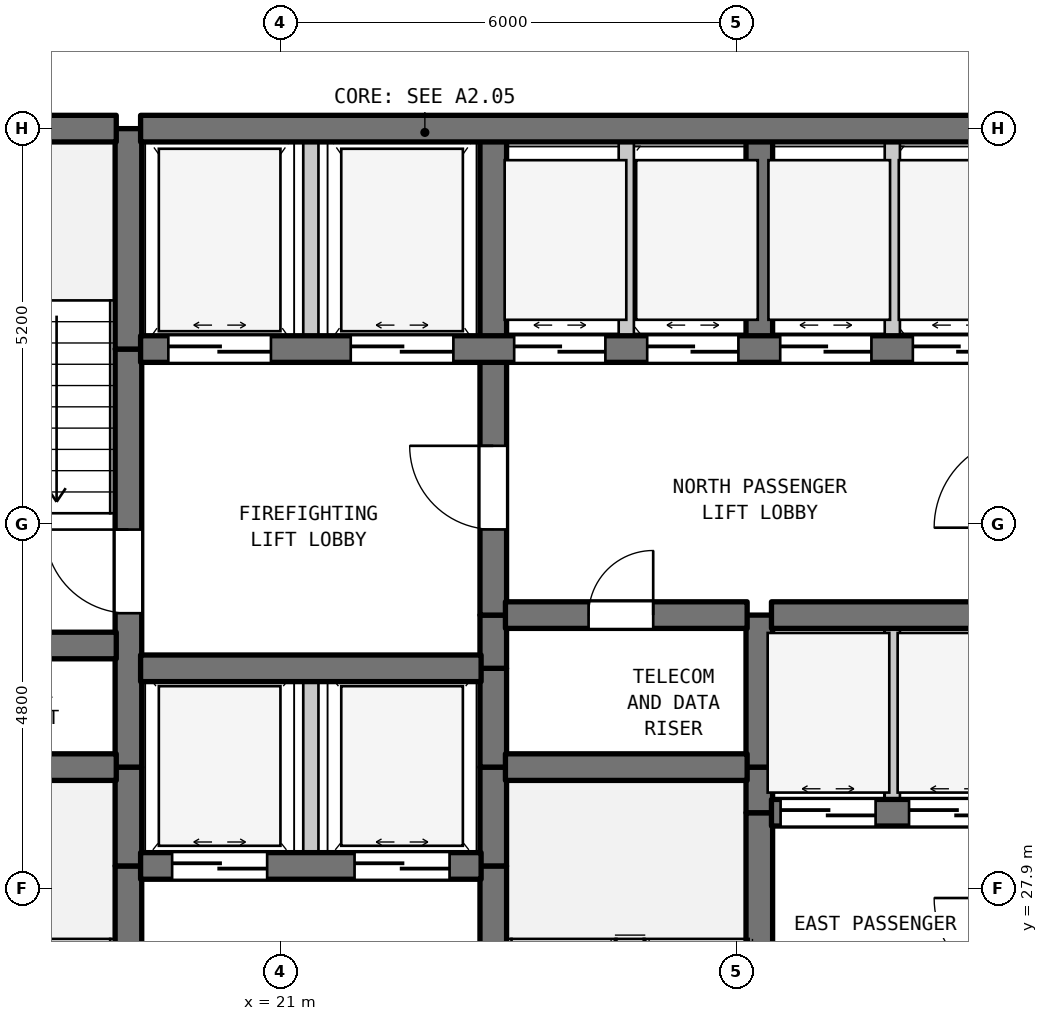
"""IFC4 building model, lengths in metres.
Left out: names, types, materials, properties, quantities, classifications, styles, units other than length and angle.
Written with IfcOpenShell. Run it as: python <this file> out.ifc"""

import sys

from ifc_helpers import new_model, si_unit, direction, frame, frame_2d, origin, place, context, subcontext, project, spatial, rectangle, extrude, element, fill, save


model = new_model("IFC4")
c1 = context("Model", 3, precision=1e-05, world=origin(), true_north=direction((0.0, 1.0)))
c2 = subcontext(c1, "Body", "Model", "MODEL_VIEW")
j1 = project(units=[si_unit("LENGTHUNIT", "METRE"), si_unit("PLANEANGLEUNIT", "RADIAN")], contexts=[c1])
p1 = place(None, origin())
s1 = spatial("IfcSite", under=j1, at=p1, CompositionType="ELEMENT")
p2 = place(p1, origin())
s2 = spatial("IfcBuilding", under=s1, at=p2, CompositionType="ELEMENT")
p3 = place(p2, frame((0.0, 0.0, 113.1)))
s3 = spatial("IfcBuildingStorey", under=s2, at=p3, CompositionType="ELEMENT", Elevation=113.1)
p4 = place(p3, frame((19.0, 22.7, 0.0), z_axis=(0.0, 0.0, 1.0), x_axis=(0.0, 1.0, 0.0)))
e1 = element("IfcWall", 1, at=p4, inside=s3, PredefinedType="SHEAR", context=c2, shape_type="SweptSolid", body=[
    extrude(rectangle(XDim=5.5, YDim=0.35, at=frame_2d((2.75, 0.0))), origin(), (0.0, 0.0, 1.0), 3.385),
])
p5 = place(p4, frame((0.631, 0.0, 0.0)))
e2 = element("IfcOpeningElement", 2, at=p5, cuts=e1, PredefinedType="OPENING", context=c2, shape_type="SweptSolid", body=[
    extrude(rectangle(XDim=1.1, YDim=2.15, at=frame_2d((0.55, 1.075))), frame((0.0, 0.185, 0.0), z_axis=(0.0, -1.0, 0.0), x_axis=(1.0, 0.0, 0.0)), (0.0, 0.0, 1.0), 0.37),
])
p6 = place(p3, frame((19.0, 28.2, 0.0), z_axis=(0.0, 0.0, 1.0), x_axis=(0.0, 1.0, 0.0)))
e3 = element("IfcWall", 3, at=p6, inside=s3, PredefinedType="SHEAR", context=c2, shape_type="SweptSolid", body=[
    extrude(rectangle(XDim=1.3, YDim=0.35, at=frame_2d((0.65, 0.0))), origin(), (0.0, 0.0, 1.0), 3.385),
])
p7 = place(p3, frame((19.0, 29.5, 0.0), z_axis=(0.0, 0.0, 1.0), x_axis=(0.0, 1.0, 0.0)))
e4 = element("IfcWall", 4, at=p7, inside=s3, PredefinedType="SHEAR", context=c2, shape_type="SweptSolid", body=[
    extrude(rectangle(XDim=5.5, YDim=0.35, at=frame_2d((2.75, 0.0))), origin(), (0.0, 0.0, 1.0), 3.385),
])
p8 = place(p7, frame((2.025, 0.0, 0.0)))
e5 = element("IfcOpeningElement", 5, at=p8, cuts=e4, PredefinedType="OPENING", context=c2, shape_type="SweptSolid", body=[
    extrude(rectangle(XDim=1.1, YDim=2.15, at=frame_2d((0.55, 1.075))), frame((0.0, 0.185, 0.0), z_axis=(0.0, -1.0, 0.0), x_axis=(1.0, 0.0, 0.0)), (0.0, 0.0, 1.0), 0.37),
])
p9 = place(p3, frame((19.0, 35.0, 0.0), z_axis=(0.0, 0.0, 1.0), x_axis=(0.0, 1.0, 0.0)))
e6 = element("IfcWall", 6, at=p9, inside=s3, PredefinedType="SHEAR", context=c2, shape_type="SweptSolid", body=[
    extrude(rectangle(XDim=2.9, YDim=0.35, at=frame_2d((1.45, 0.0))), origin(), (0.0, 0.0, 1.0), 3.385),
])
p10 = place(p3, frame((21.4, 28.2, 0.0), z_axis=(0.0, 0.0, 1.0), x_axis=(0.0, 1.0, 0.0)))
e7 = element("IfcWall", 7, at=p10, inside=s3, PredefinedType="STANDARD", context=c2, shape_type="SweptSolid", body=[
    extrude(rectangle(XDim=2.6, YDim=0.2, at=frame_2d((1.3, 0.0))), origin(), (0.0, 0.0, 1.0), 3.385),
])
p11 = place(p3, frame((21.4, 35.0, 0.0), z_axis=(0.0, 0.0, 1.0), x_axis=(0.0, 1.0, 0.0)))
e8 = element("IfcWall", 8, at=p11, inside=s3, PredefinedType="STANDARD", context=c2, shape_type="SweptSolid", body=[
    extrude(rectangle(XDim=2.9, YDim=0.2, at=frame_2d((1.45, 0.0))), origin(), (0.0, 0.0, 1.0), 3.385),
])
p12 = place(p3, frame((23.8, 22.7, 0.0), z_axis=(0.0, 0.0, 1.0), x_axis=(0.0, 1.0, 0.0)))
e9 = element("IfcWall", 9, at=p12, inside=s3, PredefinedType="SHEAR", context=c2, shape_type="SweptSolid", body=[
    extrude(rectangle(XDim=5.5, YDim=0.35, at=frame_2d((2.75, 0.0))), origin(), (0.0, 0.0, 1.0), 3.385),
])
p13 = place(p12, frame((0.235, 0.0, 0.0)))
e10 = element("IfcOpeningElement", 10, at=p13, cuts=e9, PredefinedType="OPENING", context=c2, shape_type="SweptSolid", body=[
    extrude(rectangle(XDim=1.1, YDim=2.15, at=frame_2d((0.55, 1.075))), frame((0.0, 0.185, 0.0), z_axis=(0.0, -1.0, 0.0), x_axis=(1.0, 0.0, 0.0)), (0.0, 0.0, 1.0), 0.37),
])
for number, where, z_axis, x_axis in (
    (11, (23.8, 28.2, 0.0), (0.0, 0.0, 1.0), (0.0, 1.0, 0.0)),
    (12, (23.8, 29.5, 0.0), (0.0, 0.0, 1.0), (0.0, 1.0, 0.0)),
):
    element("IfcWall", number, at=place(p3, frame(where, z_axis=z_axis, x_axis=x_axis)), inside=s3, PredefinedType="SHEAR", context=c2, shape_type="SweptSolid", body=[
        extrude(rectangle(XDim=1.3, YDim=0.35, at=frame_2d((0.65, 0.0))), origin(), (0.0, 0.0, 1.0), 3.385),
    ])
p14 = place(p3, frame((23.8, 30.8, 0.0), z_axis=(0.0, 0.0, 1.0), x_axis=(0.0, 1.0, 0.0)))
e13 = element("IfcWall", 13, at=p14, inside=s3, PredefinedType="SHEAR", context=c2, shape_type="SweptSolid", body=[
    extrude(rectangle(XDim=0.7, YDim=0.35, at=frame_2d((0.35, 0.0))), origin(), (0.0, 0.0, 1.0), 3.385),
])
p15 = place(p3, frame((23.8, 31.5, 0.0), z_axis=(0.0, 0.0, 1.0), x_axis=(0.0, 1.0, 0.0)))
e14 = element("IfcWall", 14, at=p15, inside=s3, PredefinedType="SHEAR", context=c2, shape_type="SweptSolid", body=[
    extrude(rectangle(XDim=3.5, YDim=0.35, at=frame_2d((1.75, 0.0))), origin(), (0.0, 0.0, 1.0), 3.385),
])
p16 = place(p15, frame((1.127, 0.0, 0.0)))
e15 = element("IfcOpeningElement", 15, at=p16, cuts=e14, PredefinedType="OPENING", context=c2, shape_type="SweptSolid", body=[
    extrude(rectangle(XDim=1.1, YDim=2.15, at=frame_2d((0.55, 1.075))), frame((0.0, 0.185, 0.0), z_axis=(0.0, -1.0, 0.0), x_axis=(1.0, 0.0, 0.0)), (0.0, 0.0, 1.0), 0.37),
])
p17 = place(p3, frame((23.8, 35.0, 0.0), z_axis=(0.0, 0.0, 1.0), x_axis=(0.0, 1.0, 0.0)))
e16 = element("IfcWall", 16, at=p17, inside=s3, PredefinedType="SHEAR", context=c2, shape_type="SweptSolid", body=[
    extrude(rectangle(XDim=2.9, YDim=0.35, at=frame_2d((1.45, 0.0))), origin(), (0.0, 0.0, 1.0), 3.385),
])
p18 = place(p3, frame((25.55, 35.0, 0.0), z_axis=(0.0, 0.0, 1.0), x_axis=(0.0, 1.0, 0.0)))
e17 = element("IfcWall", 17, at=p18, inside=s3, PredefinedType="STANDARD", context=c2, shape_type="SweptSolid", body=[
    extrude(rectangle(XDim=2.9, YDim=0.2, at=frame_2d((1.45, 0.0))), origin(), (0.0, 0.0, 1.0), 3.385),
])
p19 = place(p3, frame((27.3, 25.6, 0.0), z_axis=(0.0, 0.0, 1.0), x_axis=(0.0, 1.0, 0.0)))
e18 = element("IfcWall", 18, at=p19, inside=s3, PredefinedType="SHEAR", context=c2, shape_type="SweptSolid", body=[
    extrude(rectangle(XDim=3.3, YDim=0.35, at=frame_2d((1.65, 0.0))), origin(), (0.0, 0.0, 1.0), 3.385),
])
p20 = place(p3, frame((27.3, 28.9, 0.0), z_axis=(0.0, 0.0, 1.0), x_axis=(0.0, 1.0, 0.0)))
e19 = element("IfcWall", 19, at=p20, inside=s3, PredefinedType="SHEAR", context=c2, shape_type="SweptSolid", body=[
    extrude(rectangle(XDim=0.6, YDim=0.35, at=frame_2d((0.3, 0.0))), origin(), (0.0, 0.0, 1.0), 3.385),
])
p21 = place(p3, frame((27.3, 29.5, 0.0), z_axis=(0.0, 0.0, 1.0), x_axis=(0.0, 1.0, 0.0)))
e20 = element("IfcWall", 20, at=p21, inside=s3, PredefinedType="SHEAR", context=c2, shape_type="SweptSolid", body=[
    extrude(rectangle(XDim=2.0, YDim=0.35, at=frame_2d((1.0, 0.0))), origin(), (0.0, 0.0, 1.0), 3.385),
])
p22 = place(p3, frame((27.3, 35.0, 0.0), z_axis=(0.0, 0.0, 1.0), x_axis=(0.0, 1.0, 0.0)))
e21 = element("IfcWall", 21, at=p22, inside=s3, PredefinedType="SHEAR", context=c2, shape_type="SweptSolid", body=[
    extrude(rectangle(XDim=2.9, YDim=0.35, at=frame_2d((1.45, 0.0))), origin(), (0.0, 0.0, 1.0), 3.385),
])
p23 = place(p3, frame((29.05, 28.9, 0.0), z_axis=(0.0, 0.0, 1.0), x_axis=(0.0, 1.0, 0.0)))
e22 = element("IfcWall", 22, at=p23, inside=s3, PredefinedType="STANDARD", context=c2, shape_type="SweptSolid", body=[
    extrude(rectangle(XDim=2.6, YDim=0.2, at=frame_2d((1.3, 0.0))), origin(), (0.0, 0.0, 1.0), 3.385),
])
p24 = place(p3, frame((29.05, 35.0, 0.0), z_axis=(0.0, 0.0, 1.0), x_axis=(0.0, 1.0, 0.0)))
e23 = element("IfcWall", 23, at=p24, inside=s3, PredefinedType="STANDARD", context=c2, shape_type="SweptSolid", body=[
    extrude(rectangle(XDim=2.9, YDim=0.2, at=frame_2d((1.45, 0.0))), origin(), (0.0, 0.0, 1.0), 3.385),
])
p25 = place(p3, frame((19.16, 28.2, 0.0), z_axis=(0.0, 0.0, 1.0), x_axis=(1.0, 0.0, 0.0)))
e24 = element("IfcWall", 24, at=p25, inside=s3, PredefinedType="SHEAR", context=c2, shape_type="SweptSolid", body=[
    extrude(rectangle(XDim=4.48, YDim=0.35, at=frame_2d((2.24, 0.0))), origin(), (0.0, 0.0, 1.0), 3.385),
])
p26 = place(p25, frame((0.415, 0.0, 0.0)))
e25 = element("IfcOpeningElement", 25, at=p26, cuts=e24, PredefinedType="OPENING", context=c2, shape_type="SweptSolid", body=[
    extrude(rectangle(XDim=1.25, YDim=2.2, at=frame_2d((0.625, 1.1))), frame((0.0, 0.185, 0.0), z_axis=(0.0, -1.0, 0.0), x_axis=(1.0, 0.0, 0.0)), (0.0, 0.0, 1.0), 0.37),
])
p27 = place(p25, frame((2.815, 0.0, 0.0)))
e26 = element("IfcOpeningElement", 26, at=p27, cuts=e24, PredefinedType="OPENING", context=c2, shape_type="SweptSolid", body=[
    extrude(rectangle(XDim=1.25, YDim=2.2, at=frame_2d((0.625, 1.1))), frame((0.0, 0.185, 0.0), z_axis=(0.0, -1.0, 0.0), x_axis=(1.0, 0.0, 0.0)), (0.0, 0.0, 1.0), 0.37),
])
p28 = place(p3, frame((27.46, 28.9, 0.0), z_axis=(0.0, 0.0, 1.0), x_axis=(1.0, 0.0, 0.0)))
e27 = element("IfcWall", 27, at=p28, inside=s3, PredefinedType="SHEAR", context=c2, shape_type="SweptSolid", body=[
    extrude(rectangle(XDim=3.18, YDim=0.35, at=frame_2d((1.59, 0.0))), origin(), (0.0, 0.0, 1.0), 3.385),
])
p29 = place(p28, frame((0.12, 0.0, 0.0)))
e28 = element("IfcOpeningElement", 28, at=p29, cuts=e27, PredefinedType="OPENING", context=c2, shape_type="SweptSolid", body=[
    extrude(rectangle(XDim=1.25, YDim=2.2, at=frame_2d((0.625, 1.1))), frame((0.0, 0.185, 0.0), z_axis=(0.0, -1.0, 0.0), x_axis=(1.0, 0.0, 0.0)), (0.0, 0.0, 1.0), 0.37),
])
p30 = place(p28, frame((1.81, 0.0, 0.0)))
e29 = element("IfcOpeningElement", 29, at=p30, cuts=e27, PredefinedType="OPENING", context=c2, shape_type="SweptSolid", body=[
    extrude(rectangle(XDim=1.25, YDim=2.2, at=frame_2d((0.625, 1.1))), frame((0.0, 0.185, 0.0), z_axis=(0.0, -1.0, 0.0), x_axis=(1.0, 0.0, 0.0)), (0.0, 0.0, 1.0), 0.37),
])
p31 = place(p3, frame((15.16, 29.5, 0.0), z_axis=(0.0, 0.0, 1.0), x_axis=(1.0, 0.0, 0.0)))
e30 = element("IfcWall", 30, at=p31, inside=s3, PredefinedType="SHEAR", context=c2, shape_type="SweptSolid", body=[
    extrude(rectangle(XDim=3.68, YDim=0.35, at=frame_2d((1.84, 0.0))), origin(), (0.0, 0.0, 1.0), 3.385),
])
p32 = place(p3, frame((23.96, 29.5, 0.0), z_axis=(0.0, 0.0, 1.0), x_axis=(1.0, 0.0, 0.0)))
e31 = element("IfcWall", 31, at=p32, inside=s3, PredefinedType="SHEAR", context=c2, shape_type="SweptSolid", body=[
    extrude(rectangle(XDim=3.18, YDim=0.35, at=frame_2d((1.59, 0.0))), origin(), (0.0, 0.0, 1.0), 3.385),
])
p33 = place(p3, frame((19.16, 30.8, 0.0), z_axis=(0.0, 0.0, 1.0), x_axis=(1.0, 0.0, 0.0)))
e32 = element("IfcWall", 32, at=p33, inside=s3, PredefinedType="SHEAR", context=c2, shape_type="SweptSolid", body=[
    extrude(rectangle(XDim=4.48, YDim=0.35, at=frame_2d((2.24, 0.0))), origin(), (0.0, 0.0, 1.0), 3.385),
])
p34 = place(p3, frame((15.16, 31.1, 0.0), z_axis=(0.0, 0.0, 1.0), x_axis=(1.0, 0.0, 0.0)))
e33 = element("IfcWall", 33, at=p34, inside=s3, PredefinedType="SHEAR", context=c2, shape_type="SweptSolid", body=[
    extrude(rectangle(XDim=3.68, YDim=0.35, at=frame_2d((1.84, 0.0))), origin(), (0.0, 0.0, 1.0), 3.385),
])
p35 = place(p3, frame((23.96, 31.5, 0.0), z_axis=(0.0, 0.0, 1.0), x_axis=(1.0, 0.0, 0.0)))
e34 = element("IfcWall", 34, at=p35, inside=s3, PredefinedType="SHEAR", context=c2, shape_type="SweptSolid", body=[
    extrude(rectangle(XDim=3.18, YDim=0.35, at=frame_2d((1.59, 0.0))), origin(), (0.0, 0.0, 1.0), 3.385),
])
p36 = place(p35, frame((1.094, 0.0, 0.0)))
e35 = element("IfcOpeningElement", 35, at=p36, cuts=e34, PredefinedType="OPENING", context=c2, shape_type="SweptSolid", body=[
    extrude(rectangle(XDim=0.85, YDim=2.1, at=frame_2d((0.425, 1.05))), frame((0.0, 0.185, 0.0), z_axis=(0.0, -1.0, 0.0), x_axis=(1.0, 0.0, 0.0)), (0.0, 0.0, 1.0), 0.37),
])
p37 = place(p3, frame((27.46, 31.5, 0.0), z_axis=(0.0, 0.0, 1.0), x_axis=(1.0, 0.0, 0.0)))
e36 = element("IfcWall", 36, at=p37, inside=s3, PredefinedType="SHEAR", context=c2, shape_type="SweptSolid", body=[
    extrude(rectangle(XDim=3.18, YDim=0.35, at=frame_2d((1.59, 0.0))), origin(), (0.0, 0.0, 1.0), 3.385),
])
p38 = place(p3, frame((19.16, 35.0, 0.0), z_axis=(0.0, 0.0, 1.0), x_axis=(1.0, 0.0, 0.0)))
e37 = element("IfcWall", 37, at=p38, inside=s3, PredefinedType="SHEAR", context=c2, shape_type="SweptSolid", body=[
    extrude(rectangle(XDim=11.48, YDim=0.35, at=frame_2d((5.74, 0.0))), origin(), (0.0, 0.0, 1.0), 3.385),
])
p39 = place(p38, frame((0.365, 0.0, 0.0)))
e38 = element("IfcOpeningElement", 38, at=p39, cuts=e37, PredefinedType="OPENING", context=c2, shape_type="SweptSolid", body=[
    extrude(rectangle(XDim=1.35, YDim=2.2, at=frame_2d((0.675, 1.1))), frame((0.0, 0.185, 0.0), z_axis=(0.0, -1.0, 0.0), x_axis=(1.0, 0.0, 0.0)), (0.0, 0.0, 1.0), 0.37),
])
p40 = place(p38, frame((2.765, 0.0, 0.0)))
e39 = element("IfcOpeningElement", 39, at=p40, cuts=e37, PredefinedType="OPENING", context=c2, shape_type="SweptSolid", body=[
    extrude(rectangle(XDim=1.35, YDim=2.2, at=frame_2d((0.675, 1.1))), frame((0.0, 0.185, 0.0), z_axis=(0.0, -1.0, 0.0), x_axis=(1.0, 0.0, 0.0)), (0.0, 0.0, 1.0), 0.37),
])
p41 = place(p38, frame((4.915, 0.0, 0.0)))
e40 = element("IfcOpeningElement", 40, at=p41, cuts=e37, PredefinedType="OPENING", context=c2, shape_type="SweptSolid", body=[
    extrude(rectangle(XDim=1.2, YDim=2.2, at=frame_2d((0.6, 1.1))), frame((0.0, 0.185, 0.0), z_axis=(0.0, -1.0, 0.0), x_axis=(1.0, 0.0, 0.0)), (0.0, 0.0, 1.0), 0.37),
])
p42 = place(p38, frame((6.665, 0.0, 0.0)))
e41 = element("IfcOpeningElement", 41, at=p42, cuts=e37, PredefinedType="OPENING", context=c2, shape_type="SweptSolid", body=[
    extrude(rectangle(XDim=1.2, YDim=2.2, at=frame_2d((0.6, 1.1))), frame((0.0, 0.185, 0.0), z_axis=(0.0, -1.0, 0.0), x_axis=(1.0, 0.0, 0.0)), (0.0, 0.0, 1.0), 0.37),
])
p43 = place(p38, frame((8.415, 0.0, 0.0)))
e42 = element("IfcOpeningElement", 42, at=p43, cuts=e37, PredefinedType="OPENING", context=c2, shape_type="SweptSolid", body=[
    extrude(rectangle(XDim=1.2, YDim=2.2, at=frame_2d((0.6, 1.1))), frame((0.0, 0.185, 0.0), z_axis=(0.0, -1.0, 0.0), x_axis=(1.0, 0.0, 0.0)), (0.0, 0.0, 1.0), 0.37),
])
p44 = place(p38, frame((10.16, 0.0, 0.0)))
e43 = element("IfcOpeningElement", 43, at=p44, cuts=e37, PredefinedType="OPENING", context=c2, shape_type="SweptSolid", body=[
    extrude(rectangle(XDim=1.2, YDim=2.2, at=frame_2d((0.6, 1.1))), frame((0.0, 0.185, 0.0), z_axis=(0.0, -1.0, 0.0), x_axis=(1.0, 0.0, 0.0)), (0.0, 0.0, 1.0), 0.37),
])
p45 = place(p3, frame((15.16, 37.9, 0.0), z_axis=(0.0, 0.0, 1.0), x_axis=(1.0, 0.0, 0.0)))
e44 = element("IfcWall", 44, at=p45, inside=s3, PredefinedType="SHEAR", context=c2, shape_type="SweptSolid", body=[
    extrude(rectangle(XDim=3.68, YDim=0.35, at=frame_2d((1.84, 0.0))), origin(), (0.0, 0.0, 1.0), 3.385),
])
p46 = place(p3, frame((19.16, 37.9, 0.0), z_axis=(0.0, 0.0, 1.0), x_axis=(1.0, 0.0, 0.0)))
e45 = element("IfcWall", 45, at=p46, inside=s3, PredefinedType="SHEAR", context=c2, shape_type="SweptSolid", body=[
    extrude(rectangle(XDim=11.48, YDim=0.35, at=frame_2d((5.74, 0.0))), origin(), (0.0, 0.0, 1.0), 3.385),
])
p47 = place(p8, origin())
e46 = element("IfcDoor", 46, at=p47, inside=s3, OperationType="SINGLE_SWING_RIGHT", PredefinedType="DOOR", context=c2, shape_type="SweptSolid", body=[
    extrude(rectangle(XDim=1.1, YDim=2.15, at=frame_2d((0.55, 1.075))), frame((0.0, 0.025, 0.0), z_axis=(0.0, -1.0, 0.0), x_axis=(1.0, 0.0, 0.0)), (0.0, 0.0, 1.0), 0.05),
])
fill(e5, e46)
p48 = place(p16, origin())
e47 = element("IfcDoor", 47, at=p48, inside=s3, OperationType="SINGLE_SWING_RIGHT", PredefinedType="DOOR", context=c2, shape_type="SweptSolid", body=[
    extrude(rectangle(XDim=1.1, YDim=2.15, at=frame_2d((0.55, 1.075))), frame((0.0, 0.025, 0.0), z_axis=(0.0, -1.0, 0.0), x_axis=(1.0, 0.0, 0.0)), (0.0, 0.0, 1.0), 0.05),
])
fill(e15, e47)
p49 = place(p26, origin())
e48 = element("IfcDoor", 48, at=p49, inside=s3, OperationType="DOUBLE_DOOR_SLIDING", PredefinedType="DOOR", context=c2, shape_type="SweptSolid", body=[
    extrude(rectangle(XDim=1.25, YDim=2.2, at=frame_2d((0.625, 1.1))), frame((0.0, 0.025, 0.0), z_axis=(0.0, -1.0, 0.0), x_axis=(1.0, 0.0, 0.0)), (0.0, 0.0, 1.0), 0.05),
])
fill(e25, e48)
p50 = place(p27, origin())
e49 = element("IfcDoor", 49, at=p50, inside=s3, OperationType="DOUBLE_DOOR_SLIDING", PredefinedType="DOOR", context=c2, shape_type="SweptSolid", body=[
    extrude(rectangle(XDim=1.25, YDim=2.2, at=frame_2d((0.625, 1.1))), frame((0.0, 0.025, 0.0), z_axis=(0.0, -1.0, 0.0), x_axis=(1.0, 0.0, 0.0)), (0.0, 0.0, 1.0), 0.05),
])
fill(e26, e49)
p51 = place(p29, origin())
e50 = element("IfcDoor", 50, at=p51, inside=s3, OperationType="DOUBLE_DOOR_SLIDING", PredefinedType="DOOR", context=c2, shape_type="SweptSolid", body=[
    extrude(rectangle(XDim=1.25, YDim=2.2, at=frame_2d((0.625, 1.1))), frame((0.0, 0.025, 0.0), z_axis=(0.0, -1.0, 0.0), x_axis=(1.0, 0.0, 0.0)), (0.0, 0.0, 1.0), 0.05),
])
fill(e28, e50)
p52 = place(p30, origin())
e51 = element("IfcDoor", 51, at=p52, inside=s3, OperationType="DOUBLE_DOOR_SLIDING", PredefinedType="DOOR", context=c2, shape_type="SweptSolid", body=[
    extrude(rectangle(XDim=1.25, YDim=2.2, at=frame_2d((0.625, 1.1))), frame((0.0, 0.025, 0.0), z_axis=(0.0, -1.0, 0.0), x_axis=(1.0, 0.0, 0.0)), (0.0, 0.0, 1.0), 0.05),
])
fill(e29, e51)
p53 = place(p36, origin())
e52 = element("IfcDoor", 52, at=p53, inside=s3, OperationType="SINGLE_SWING_RIGHT", PredefinedType="DOOR", context=c2, shape_type="SweptSolid", body=[
    extrude(rectangle(XDim=0.85, YDim=2.1, at=frame_2d((0.425, 1.05))), frame((0.0, 0.025, 0.0), z_axis=(0.0, -1.0, 0.0), x_axis=(1.0, 0.0, 0.0)), (0.0, 0.0, 1.0), 0.05),
])
fill(e35, e52)
p54 = place(p39, origin())
e53 = element("IfcDoor", 53, at=p54, inside=s3, OperationType="DOUBLE_DOOR_SLIDING", PredefinedType="DOOR", context=c2, shape_type="SweptSolid", body=[
    extrude(rectangle(XDim=1.35, YDim=2.2, at=frame_2d((0.675, 1.1))), frame((0.0, 0.025, 0.0), z_axis=(0.0, -1.0, 0.0), x_axis=(1.0, 0.0, 0.0)), (0.0, 0.0, 1.0), 0.05),
])
fill(e38, e53)
p55 = place(p40, origin())
e54 = element("IfcDoor", 54, at=p55, inside=s3, OperationType="DOUBLE_DOOR_SLIDING", PredefinedType="DOOR", context=c2, shape_type="SweptSolid", body=[
    extrude(rectangle(XDim=1.35, YDim=2.2, at=frame_2d((0.675, 1.1))), frame((0.0, 0.025, 0.0), z_axis=(0.0, -1.0, 0.0), x_axis=(1.0, 0.0, 0.0)), (0.0, 0.0, 1.0), 0.05),
])
fill(e39, e54)
p56 = place(p41, origin())
e55 = element("IfcDoor", 55, at=p56, inside=s3, OperationType="DOUBLE_DOOR_SLIDING", PredefinedType="DOOR", context=c2, shape_type="SweptSolid", body=[
    extrude(rectangle(XDim=1.2, YDim=2.2, at=frame_2d((0.6, 1.1))), frame((0.0, 0.025, 0.0), z_axis=(0.0, -1.0, 0.0), x_axis=(1.0, 0.0, 0.0)), (0.0, 0.0, 1.0), 0.05),
])
fill(e40, e55)
p57 = place(p42, origin())
e56 = element("IfcDoor", 56, at=p57, inside=s3, OperationType="DOUBLE_DOOR_SLIDING", PredefinedType="DOOR", context=c2, shape_type="SweptSolid", body=[
    extrude(rectangle(XDim=1.2, YDim=2.2, at=frame_2d((0.6, 1.1))), frame((0.0, 0.025, 0.0), z_axis=(0.0, -1.0, 0.0), x_axis=(1.0, 0.0, 0.0)), (0.0, 0.0, 1.0), 0.05),
])
fill(e41, e56)
p58 = place(p43, origin())
e57 = element("IfcDoor", 57, at=p58, inside=s3, OperationType="DOUBLE_DOOR_SLIDING", PredefinedType="DOOR", context=c2, shape_type="SweptSolid", body=[
    extrude(rectangle(XDim=1.2, YDim=2.2, at=frame_2d((0.6, 1.1))), frame((0.0, 0.025, 0.0), z_axis=(0.0, -1.0, 0.0), x_axis=(1.0, 0.0, 0.0)), (0.0, 0.0, 1.0), 0.05),
])
fill(e42, e57)
p59 = place(p44, origin())
e58 = element("IfcDoor", 58, at=p59, inside=s3, OperationType="DOUBLE_DOOR_SLIDING", PredefinedType="DOOR", context=c2, shape_type="SweptSolid", body=[
    extrude(rectangle(XDim=1.2, YDim=2.2, at=frame_2d((0.6, 1.1))), frame((0.0, 0.025, 0.0), z_axis=(0.0, -1.0, 0.0), x_axis=(1.0, 0.0, 0.0)), (0.0, 0.0, 1.0), 0.05),
])
fill(e43, e58)
save(model, sys.argv[1])
